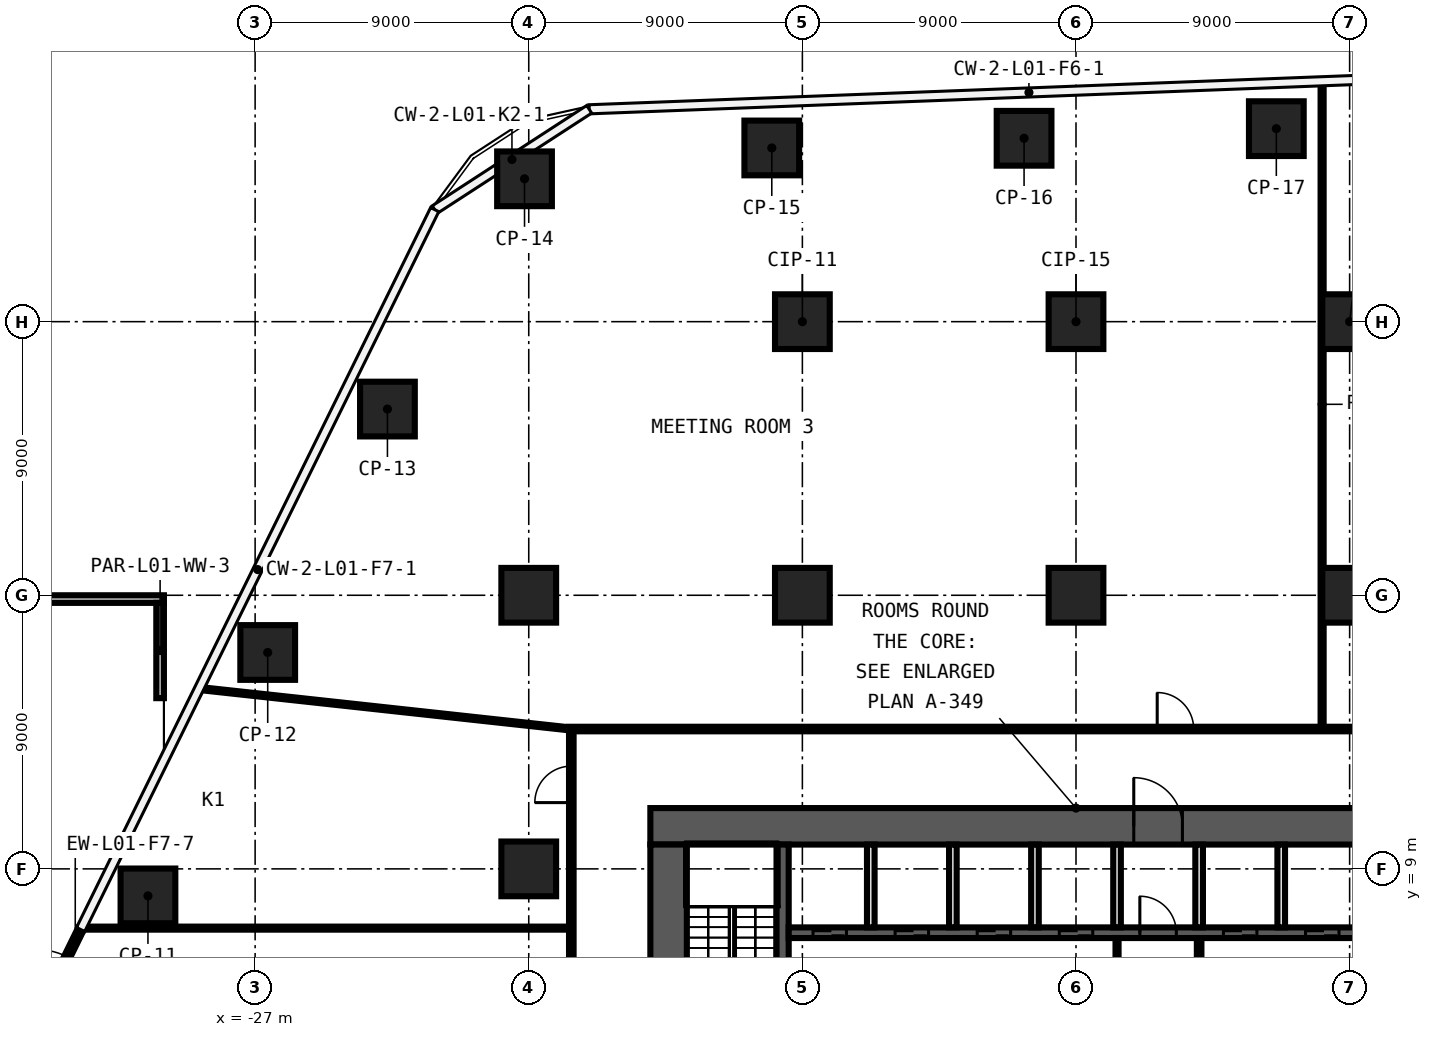
"""IFC4 building model, lengths in metres.
Left out: names, types, materials, properties, quantities, classifications, styles, units other than length and angle.
Written with IfcOpenShell. Run it as: python <this file> out.ifc"""

import sys

from ifc_helpers import new_model, si_unit, direction, frame, frame_2d, origin, origin_2d, place, context, subcontext, project, spatial, rectangle, extrude, element, fill, save


model = new_model("IFC4")
c1 = context("Model", 3, precision=1e-05, world=origin(), true_north=direction((0.0, 1.0)))
c2 = subcontext(c1, "Body", "Model", "MODEL_VIEW")
j1 = project(units=[si_unit("LENGTHUNIT", "METRE"), si_unit("PLANEANGLEUNIT", "RADIAN")], contexts=[c1])
p1 = place(None, origin())
s1 = spatial("IfcSite", under=j1, at=p1, CompositionType="ELEMENT")
p2 = place(p1, origin())
s2 = spatial("IfcBuilding", under=s1, at=p2, CompositionType="ELEMENT")
p3 = place(p2, frame((0.0, 0.0, 9.0)))
s3 = spatial("IfcBuildingStorey", under=s2, at=p3, CompositionType="ELEMENT", Elevation=9.0)
for number, where, z_axis, x_axis in (
    (1, (-30.525, 8.111, 0.0), (0.0, 0.0, 1.0), (1.0, 0.0, 0.0)),
    (2, (-26.586, 16.118, 0.0), (0.0, 0.0, 1.0), (1.0, 0.0, 0.0)),
    (3, (-22.648, 24.125, 0.0), (0.0, 0.0, 1.0), (1.0, 0.0, 0.0)),
    (4, (-18.139, 31.699, 0.0), (0.0, 0.0, 1.0), (1.0, 0.0, 0.0)),
    (5, (-10.006, 32.714, 0.0), (0.0, 0.0, 1.0), (1.0, 0.0, 0.0)),
    (6, (-1.708, 33.032, 0.0), (0.0, 0.0, 1.0), (1.0, 0.0, 0.0)),
    (7, (6.589, 33.349, 0.0), (0.0, 0.0, 1.0), (1.0, 0.0, 0.0)),
    (8, (-18.0, 9.0, 0.0), (0.0, 0.0, 1.0), (1.0, 0.0, 0.0)),
    (9, (-18.0, 18.0, 0.0), (0.0, 0.0, 1.0), (1.0, 0.0, 0.0)),
    (10, (-9.0, 18.0, 0.0), (0.0, 0.0, 1.0), (1.0, 0.0, 0.0)),
    (11, (-9.0, 27.0, 0.0), (0.0, 0.0, 1.0), (1.0, 0.0, 0.0)),
    (12, (0.0, 18.0, 0.0), (0.0, 0.0, 1.0), (1.0, 0.0, 0.0)),
    (13, (0.0, 27.0, 0.0), (0.0, 0.0, 1.0), (1.0, 0.0, 0.0)),
    (14, (9.0, 18.0, 0.0), (0.0, 0.0, 1.0), (1.0, 0.0, 0.0)),
    (15, (9.0, 27.0, 0.0), (0.0, 0.0, 1.0), (1.0, 0.0, 0.0)),
):
    element("IfcColumn", number, at=place(p3, frame(where, z_axis=z_axis, x_axis=x_axis)), inside=s3, PredefinedType="COLUMN", context=c2, shape_type="SweptSolid", body=[
        extrude(rectangle(XDim=1.8, YDim=1.8, at=origin_2d()), origin(), (0.0, 0.0, 1.0), 9.55),
    ])
p4 = place(p3, frame((-32.695, 7.051, 0.0), z_axis=(0.0, 0.0, 1.0), x_axis=(1.0, 0.0, 0.0)))
e16 = element("IfcWall", 16, at=p4, inside=s3, PredefinedType="PARTITIONING", context=c2, shape_type="SweptSolid", body=[
    extrude(rectangle(XDim=16.02, YDim=0.1, at=frame_2d((8.01, 0.0))), origin(), (0.0, 0.0, 1.0), 9.55),
])
p5 = place(p3, frame((-16.675, 13.6, 0.0), z_axis=(0.0, 0.0, 1.0), x_axis=(1.0, 0.0, 0.0)))
e17 = element("IfcWall", 17, at=p5, inside=s3, PredefinedType="PARTITIONING", context=c2, shape_type="SweptSolid", body=[
    extrude(rectangle(XDim=33.35, YDim=0.15, at=frame_2d((16.675, 0.0))), origin(), (0.0, 0.0, 1.0), 9.55),
])
p6 = place(p5, frame((27.447, 0.0, 0.0)))
e18 = element("IfcOpeningElement", 18, at=p6, cuts=e17, PredefinedType="OPENING", context=c2, shape_type="SweptSolid", body=[
    extrude(rectangle(XDim=1.2, YDim=2.1, at=frame_2d((0.6, 1.05))), frame((0.0, 0.085, 0.0), z_axis=(0.0, -1.0, 0.0), x_axis=(1.0, 0.0, 0.0)), (0.0, 0.0, 1.0), 0.17),
])
p7 = place(p5, frame((19.346, 0.0, 0.0)))
e19 = element("IfcOpeningElement", 19, at=p7, cuts=e17, PredefinedType="OPENING", context=c2, shape_type="SweptSolid", body=[
    extrude(rectangle(XDim=1.2, YDim=2.1, at=frame_2d((0.6, 1.05))), frame((0.0, 0.085, 0.0), z_axis=(0.0, -1.0, 0.0), x_axis=(1.0, 0.0, 0.0)), (0.0, 0.0, 1.0), 0.17),
])
p8 = place(p3, frame((8.095, 13.675, 0.0), z_axis=(0.0, 0.0, 1.0), x_axis=(0.0, 1.0, 0.0)))
e20 = element("IfcWall", 20, at=p8, inside=s3, PredefinedType="PARTITIONING", context=c2, shape_type="SweptSolid", body=[
    extrude(rectangle(XDim=21.213, YDim=0.1, at=frame_2d((10.606, 0.0))), origin(), (0.0, 0.0, 1.0), 9.55),
])
p9 = place(p3, frame((-16.6, -13.525, 0.0), z_axis=(0.0, 0.0, 1.0), x_axis=(0.0, 1.0, 0.0)))
e21 = element("IfcWall", 21, at=p9, inside=s3, PredefinedType="PARTITIONING", context=c2, shape_type="SweptSolid", body=[
    extrude(rectangle(XDim=27.05, YDim=0.15, at=frame_2d((13.525, 0.0))), origin(), (0.0, 0.0, 1.0), 9.55),
])
p10 = place(p9, frame((16.028, 0.0, 0.0)))
e22 = element("IfcOpeningElement", 22, at=p10, cuts=e21, PredefinedType="OPENING", context=c2, shape_type="SweptSolid", body=[
    extrude(rectangle(XDim=1.2, YDim=2.1, at=frame_2d((0.6, 1.05))), frame((0.0, 0.085, 0.0), z_axis=(0.0, -1.0, 0.0), x_axis=(1.0, 0.0, 0.0)), (0.0, 0.0, 1.0), 0.17),
])
p11 = place(p9, frame((1.121, 0.0, 0.0)))
e23 = element("IfcOpeningElement", 23, at=p11, cuts=e21, PredefinedType="OPENING", context=c2, shape_type="SweptSolid", body=[
    extrude(rectangle(XDim=1.2, YDim=2.1, at=frame_2d((0.6, 1.05))), frame((0.0, 0.085, 0.0), z_axis=(0.0, -1.0, 0.0), x_axis=(1.0, 0.0, 0.0)), (0.0, 0.0, 1.0), 0.17),
])
p12 = place(p9, frame((24.705, 0.0, 0.0)))
e24 = element("IfcOpeningElement", 24, at=p12, cuts=e21, PredefinedType="OPENING", context=c2, shape_type="SweptSolid", body=[
    extrude(rectangle(XDim=1.2, YDim=2.1, at=frame_2d((0.6, 1.05))), frame((0.0, 0.085, 0.0), z_axis=(0.0, -1.0, 0.0), x_axis=(1.0, 0.0, 0.0)), (0.0, 0.0, 1.0), 0.17),
])
p13 = place(p3, frame((-28.819, 14.931, 0.0), z_axis=(0.0, 0.0, 1.0), x_axis=(0.994112645196, -0.108351505116, 0.0)))
e25 = element("IfcWall", 25, at=p13, inside=s3, PredefinedType="PARTITIONING", context=c2, shape_type="SweptSolid", body=[
    extrude(rectangle(XDim=12.291, YDim=0.1, at=frame_2d((6.146, 0.0))), origin(), (0.0, 0.0, 1.0), 9.55),
])
p14 = place(p3, frame((-34.681, 3.059, 0.0), z_axis=(0.0, 0.0, 1.0), x_axis=(0.441343829608, 0.897338076796, 0.0)))
e26 = element("IfcWall", 26, at=p14, inside=s3, PredefinedType="SOLIDWALL", context=c2, shape_type="SweptSolid", body=[
    extrude(rectangle(XDim=4.399, YDim=0.2, at=frame_2d((2.2, 0.0))), origin(), (0.0, 0.0, 1.0), 9.55),
])
p15 = place(p14, frame((1.0, 0.0, 0.0)))
e27 = element("IfcOpeningElement", 27, at=p15, cuts=e26, PredefinedType="OPENING", context=c2, shape_type="SweptSolid", body=[
    extrude(rectangle(XDim=2.4, YDim=2.4, at=frame_2d((1.2, 1.2))), frame((0.0, 0.11, 0.0), z_axis=(0.0, -1.0, 0.0), x_axis=(1.0, 0.0, 0.0)), (0.0, 0.0, 1.0), 0.22),
])
p16 = place(p3, frame((-57.75, 17.875, 0.0), z_axis=(0.0, 0.0, 1.0), x_axis=(1.0, 0.0, 0.0)))
e28 = element("IfcWall", 28, at=p16, inside=s3, PredefinedType="PARAPET", context=c2, shape_type="SweptSolid", body=[
    extrude(rectangle(XDim=27.75, YDim=0.25, at=frame_2d((13.875, 0.0))), origin(), (0.0, 0.0, 1.0), 1.2),
])
p17 = place(p3, frame((-30.125, 17.75, 0.0), z_axis=(0.0, 0.0, 1.0), x_axis=(0.0, -1.0, 0.0)))
e29 = element("IfcWall", 29, at=p17, inside=s3, PredefinedType="PARAPET", context=c2, shape_type="SweptSolid", body=[
    extrude(rectangle(XDim=3.135, YDim=0.25, at=frame_2d((1.567, 0.0))), origin(), (0.0, 0.0, 1.0), 1.2),
])
p18 = place(p2, origin())
s4 = spatial("IfcBuildingStorey", under=s2, at=p18, CompositionType="ELEMENT", Elevation=0.0)
p19 = place(p18, frame((-21.05, 36.05, -0.3), z_axis=(0.0, 0.0, 1.0), x_axis=(1.0, 0.0, 0.0)))
e30 = element("IfcColumn", 30, at=p19, inside=s4, PredefinedType="COLUMN", context=c2, shape_type="SweptSolid", body=[
    extrude(rectangle(XDim=1.0, YDim=1.0, at=origin_2d()), origin(), (0.0, 0.0, 1.0), 18.85),
])
p20 = place(p3, frame((-14.0, 10.4, 0.0), z_axis=(0.0, 0.0, 1.0), x_axis=(1.0, 0.0, 0.0)))
e31 = element("IfcWall", 31, at=p20, inside=s3, PredefinedType="SHEAR", context=c2, shape_type="SweptSolid", body=[
    extrude(rectangle(XDim=28.0, YDim=1.2, at=frame_2d((14.0, 0.0))), origin(), (0.0, 0.0, 1.0), 9.55),
])
p21 = place(p20, frame((15.9, 0.0, 0.0)))
e32 = element("IfcOpeningElement", 32, at=p21, cuts=e31, PredefinedType="OPENING", context=c2, shape_type="SweptSolid", body=[
    extrude(rectangle(XDim=1.6, YDim=2.1, at=frame_2d((0.8, 1.05))), frame((0.0, 0.61, 0.0), z_axis=(0.0, -1.0, 0.0), x_axis=(1.0, 0.0, 0.0)), (0.0, 0.0, 1.0), 1.22),
])
p22 = place(p3, frame((-13.4, -9.8, 0.0), z_axis=(0.0, 0.0, 1.0), x_axis=(0.0, 1.0, 0.0)))
e33 = element("IfcWall", 33, at=p22, inside=s3, PredefinedType="SHEAR", context=c2, shape_type="SweptSolid", body=[
    extrude(rectangle(XDim=19.6, YDim=1.2, at=frame_2d((9.8, 0.0))), origin(), (0.0, 0.0, 1.0), 9.55),
])
p23 = place(p3, frame((-9.65, 2.3, 0.0), z_axis=(0.0, 0.0, 1.0), x_axis=(0.0, 1.0, 0.0)))
e34 = element("IfcWall", 34, at=p23, inside=s3, PredefinedType="SHEAR", context=c2, shape_type="SweptSolid", body=[
    extrude(rectangle(XDim=7.5, YDim=0.4, at=frame_2d((3.75, 0.0))), origin(), (0.0, 0.0, 1.0), 9.55),
])
p24 = place(p23, frame((1.2, 0.0, 0.0)))
e35 = element("IfcOpeningElement", 35, at=p24, cuts=e34, PredefinedType="OPENING", context=c2, shape_type="SweptSolid", body=[
    extrude(rectangle(XDim=1.2, YDim=2.1, at=frame_2d((0.6, 1.05))), frame((0.0, 0.21, 0.0), z_axis=(0.0, -1.0, 0.0), x_axis=(1.0, 0.0, 0.0)), (0.0, 0.0, 1.0), 0.42),
])
p25 = place(p3, frame((-9.45, 6.9, 0.0), z_axis=(0.0, 0.0, 1.0), x_axis=(1.0, 0.0, 0.0)))
e36 = element("IfcWall", 36, at=p25, inside=s3, PredefinedType="SHEAR", context=c2, shape_type="SweptSolid", body=[
    extrude(rectangle(XDim=18.9, YDim=0.35, at=frame_2d((9.45, 0.0))), origin(), (0.0, 0.0, 1.0), 9.55),
])
p26 = place(p25, frame((0.8, 0.0, 0.0)))
e37 = element("IfcOpeningElement", 37, at=p26, cuts=e36, PredefinedType="OPENING", context=c2, shape_type="SweptSolid", body=[
    extrude(rectangle(XDim=1.1, YDim=2.1, at=frame_2d((0.55, 1.05))), frame((0.0, 0.185, 0.0), z_axis=(0.0, -1.0, 0.0), x_axis=(1.0, 0.0, 0.0)), (0.0, 0.0, 1.0), 0.37),
])
p27 = place(p25, frame((3.5, 0.0, 0.0)))
e38 = element("IfcOpeningElement", 38, at=p27, cuts=e36, PredefinedType="OPENING", context=c2, shape_type="SweptSolid", body=[
    extrude(rectangle(XDim=1.1, YDim=2.1, at=frame_2d((0.55, 1.05))), frame((0.0, 0.185, 0.0), z_axis=(0.0, -1.0, 0.0), x_axis=(1.0, 0.0, 0.0)), (0.0, 0.0, 1.0), 0.37),
])
p28 = place(p25, frame((6.2, 0.0, 0.0)))
e39 = element("IfcOpeningElement", 39, at=p28, cuts=e36, PredefinedType="OPENING", context=c2, shape_type="SweptSolid", body=[
    extrude(rectangle(XDim=1.1, YDim=2.1, at=frame_2d((0.55, 1.05))), frame((0.0, 0.185, 0.0), z_axis=(0.0, -1.0, 0.0), x_axis=(1.0, 0.0, 0.0)), (0.0, 0.0, 1.0), 0.37),
])
p29 = place(p25, frame((8.9, 0.0, 0.0)))
e40 = element("IfcOpeningElement", 40, at=p29, cuts=e36, PredefinedType="OPENING", context=c2, shape_type="SweptSolid", body=[
    extrude(rectangle(XDim=1.1, YDim=2.1, at=frame_2d((0.55, 1.05))), frame((0.0, 0.185, 0.0), z_axis=(0.0, -1.0, 0.0), x_axis=(1.0, 0.0, 0.0)), (0.0, 0.0, 1.0), 0.37),
])
p30 = place(p25, frame((11.55, 0.0, 0.0)))
e41 = element("IfcOpeningElement", 41, at=p30, cuts=e36, PredefinedType="OPENING", context=c2, shape_type="SweptSolid", body=[
    extrude(rectangle(XDim=1.2, YDim=2.1, at=frame_2d((0.6, 1.05))), frame((0.0, 0.185, 0.0), z_axis=(0.0, -1.0, 0.0), x_axis=(1.0, 0.0, 0.0)), (0.0, 0.0, 1.0), 0.37),
])
p31 = place(p25, frame((14.3, 0.0, 0.0)))
e42 = element("IfcOpeningElement", 42, at=p31, cuts=e36, PredefinedType="OPENING", context=c2, shape_type="SweptSolid", body=[
    extrude(rectangle(XDim=1.1, YDim=2.1, at=frame_2d((0.55, 1.05))), frame((0.0, 0.185, 0.0), z_axis=(0.0, -1.0, 0.0), x_axis=(1.0, 0.0, 0.0)), (0.0, 0.0, 1.0), 0.37),
])
p32 = place(p25, frame((17.0, 0.0, 0.0)))
e43 = element("IfcOpeningElement", 43, at=p32, cuts=e36, PredefinedType="OPENING", context=c2, shape_type="SweptSolid", body=[
    extrude(rectangle(XDim=1.1, YDim=2.1, at=frame_2d((0.55, 1.05))), frame((0.0, 0.185, 0.0), z_axis=(0.0, -1.0, 0.0), x_axis=(1.0, 0.0, 0.0)), (0.0, 0.0, 1.0), 0.37),
])
p33 = place(p3, frame((6.75, 7.075, 0.0), z_axis=(0.0, 0.0, 1.0), x_axis=(0.0, 1.0, 0.0)))
e44 = element("IfcWall", 44, at=p33, inside=s3, PredefinedType="SOLIDWALL", context=c2, shape_type="SweptSolid", body=[
    extrude(rectangle(XDim=2.725, YDim=0.25, at=frame_2d((1.363, 0.0))), origin(), (0.0, 0.0, 1.0), 9.55),
])
p34 = place(p3, frame((4.05, 6.725, 0.0), z_axis=(0.0, 0.0, 1.0), x_axis=(0.0, -1.0, 0.0)))
e45 = element("IfcWall", 45, at=p34, inside=s3, PredefinedType="PARTITIONING", context=c2, shape_type="SweptSolid", body=[
    extrude(rectangle(XDim=3.25, YDim=0.15, at=frame_2d((1.625, 0.0))), origin(), (0.0, 0.0, 1.0), 9.55),
])
p35 = place(p34, frame((1.025, 0.0, 0.0)))
e46 = element("IfcOpeningElement", 46, at=p35, cuts=e45, PredefinedType="OPENING", context=c2, shape_type="SweptSolid", body=[
    extrude(rectangle(XDim=1.2, YDim=2.1, at=frame_2d((0.6, 1.05))), frame((0.0, 0.085, 0.0), z_axis=(0.0, -1.0, 0.0), x_axis=(1.0, 0.0, 0.0)), (0.0, 0.0, 1.0), 0.17),
])
p36 = place(p3, frame((4.05, 7.075, 0.0), z_axis=(0.0, 0.0, 1.0), x_axis=(0.0, 1.0, 0.0)))
e47 = element("IfcWall", 47, at=p36, inside=s3, PredefinedType="SOLIDWALL", context=c2, shape_type="SweptSolid", body=[
    extrude(rectangle(XDim=2.725, YDim=0.25, at=frame_2d((1.363, 0.0))), origin(), (0.0, 0.0, 1.0), 9.55),
])
p37 = place(p3, frame((1.35, 6.725, 0.0), z_axis=(0.0, 0.0, 1.0), x_axis=(0.0, -1.0, 0.0)))
e48 = element("IfcWall", 48, at=p37, inside=s3, PredefinedType="PARTITIONING", context=c2, shape_type="SweptSolid", body=[
    extrude(rectangle(XDim=3.25, YDim=0.1, at=frame_2d((1.625, 0.0))), origin(), (0.0, 0.0, 1.0), 9.55),
])
p38 = place(p37, frame((1.025, 0.0, 0.0)))
e49 = element("IfcOpeningElement", 49, at=p38, cuts=e48, PredefinedType="OPENING", context=c2, shape_type="SweptSolid", body=[
    extrude(rectangle(XDim=1.2, YDim=2.1, at=frame_2d((0.6, 1.05))), frame((0.0, 0.06, 0.0), z_axis=(0.0, -1.0, 0.0), x_axis=(1.0, 0.0, 0.0)), (0.0, 0.0, 1.0), 0.12),
])
for number, where, z_axis, x_axis in (
    (50, (1.35, 7.075, 0.0), (0.0, 0.0, 1.0), (0.0, 1.0, 0.0)),
    (51, (-1.35, 7.075, 0.0), (0.0, 0.0, 1.0), (0.0, 1.0, 0.0)),
    (52, (-4.05, 7.075, 0.0), (0.0, 0.0, 1.0), (0.0, 1.0, 0.0)),
    (53, (-6.75, 7.075, 0.0), (0.0, 0.0, 1.0), (0.0, 1.0, 0.0)),
):
    element("IfcWall", number, at=place(p3, frame(where, z_axis=z_axis, x_axis=x_axis)), inside=s3, PredefinedType="SOLIDWALL", context=c2, shape_type="SweptSolid", body=[
        extrude(rectangle(XDim=2.725, YDim=0.25, at=frame_2d((1.363, 0.0))), origin(), (0.0, 0.0, 1.0), 9.55),
    ])
p39 = place(p7, origin())
e54 = element("IfcDoor", 54, at=p39, inside=s3, OperationType="SINGLE_SWING_LEFT", PredefinedType="DOOR", context=c2, shape_type="SweptSolid", body=[
    extrude(rectangle(XDim=1.2, YDim=2.1, at=frame_2d((0.6, 1.05))), frame((0.0, 0.025, 0.0), z_axis=(0.0, -1.0, 0.0), x_axis=(1.0, 0.0, 0.0)), (0.0, 0.0, 1.0), 0.05),
])
fill(e19, e54)
p40 = place(p12, origin())
e55 = element("IfcDoor", 55, at=p40, inside=s3, OperationType="SINGLE_SWING_RIGHT", PredefinedType="DOOR", context=c2, shape_type="SweptSolid", body=[
    extrude(rectangle(XDim=1.2, YDim=2.1, at=frame_2d((0.6, 1.05))), frame((0.0, 0.025, 0.0), z_axis=(0.0, -1.0, 0.0), x_axis=(1.0, 0.0, 0.0)), (0.0, 0.0, 1.0), 0.05),
])
fill(e24, e55)
p41 = place(p15, origin())
e56 = element("IfcDoor", 56, at=p41, inside=s3, OperationType="SINGLE_SWING_LEFT", PredefinedType="DOOR", context=c2, shape_type="SweptSolid", body=[
    extrude(rectangle(XDim=2.4, YDim=2.4, at=frame_2d((1.2, 1.2))), frame((0.0, 0.025, 0.0), z_axis=(0.0, -1.0, 0.0), x_axis=(1.0, 0.0, 0.0)), (0.0, 0.0, 1.0), 0.05),
])
fill(e27, e56)
p42 = place(p26, origin())
e57 = element("IfcDoor", 57, at=p42, inside=s3, OperationType="DOUBLE_DOOR_SLIDING", PredefinedType="DOOR", context=c2, shape_type="SweptSolid", body=[
    extrude(rectangle(XDim=1.1, YDim=2.1, at=frame_2d((0.55, 1.05))), frame((0.0, 0.025, 0.0), z_axis=(0.0, -1.0, 0.0), x_axis=(1.0, 0.0, 0.0)), (0.0, 0.0, 1.0), 0.05),
])
fill(e37, e57)
p43 = place(p27, origin())
e58 = element("IfcDoor", 58, at=p43, inside=s3, OperationType="DOUBLE_DOOR_SLIDING", PredefinedType="DOOR", context=c2, shape_type="SweptSolid", body=[
    extrude(rectangle(XDim=1.1, YDim=2.1, at=frame_2d((0.55, 1.05))), frame((0.0, 0.025, 0.0), z_axis=(0.0, -1.0, 0.0), x_axis=(1.0, 0.0, 0.0)), (0.0, 0.0, 1.0), 0.05),
])
fill(e38, e58)
p44 = place(p28, origin())
e59 = element("IfcDoor", 59, at=p44, inside=s3, OperationType="DOUBLE_DOOR_SLIDING", PredefinedType="DOOR", context=c2, shape_type="SweptSolid", body=[
    extrude(rectangle(XDim=1.1, YDim=2.1, at=frame_2d((0.55, 1.05))), frame((0.0, 0.025, 0.0), z_axis=(0.0, -1.0, 0.0), x_axis=(1.0, 0.0, 0.0)), (0.0, 0.0, 1.0), 0.05),
])
fill(e39, e59)
p45 = place(p29, origin())
e60 = element("IfcDoor", 60, at=p45, inside=s3, OperationType="DOUBLE_DOOR_SLIDING", PredefinedType="DOOR", context=c2, shape_type="SweptSolid", body=[
    extrude(rectangle(XDim=1.1, YDim=2.1, at=frame_2d((0.55, 1.05))), frame((0.0, 0.025, 0.0), z_axis=(0.0, -1.0, 0.0), x_axis=(1.0, 0.0, 0.0)), (0.0, 0.0, 1.0), 0.05),
])
fill(e40, e60)
p46 = place(p21, origin())
e61 = element("IfcDoor", 61, at=p46, inside=s3, OperationType="DOUBLE_DOOR_SINGLE_SWING", PredefinedType="DOOR", context=c2, shape_type="SweptSolid", body=[
    extrude(rectangle(XDim=1.6, YDim=2.1, at=frame_2d((0.8, 1.05))), frame((0.0, 0.025, 0.0), z_axis=(0.0, -1.0, 0.0), x_axis=(1.0, 0.0, 0.0)), (0.0, 0.0, 1.0), 0.05),
])
fill(e32, e61)
p47 = place(p30, origin())
e62 = element("IfcDoor", 62, at=p47, inside=s3, OperationType="SINGLE_SWING_LEFT", PredefinedType="DOOR", context=c2, shape_type="SweptSolid", body=[
    extrude(rectangle(XDim=1.2, YDim=2.1, at=frame_2d((0.6, 1.05))), frame((0.0, 0.025, 0.0), z_axis=(0.0, -1.0, 0.0), x_axis=(1.0, 0.0, 0.0)), (0.0, 0.0, 1.0), 0.05),
])
fill(e41, e62)
p48 = place(p31, origin())
e63 = element("IfcDoor", 63, at=p48, inside=s3, OperationType="DOUBLE_DOOR_SLIDING", PredefinedType="DOOR", context=c2, shape_type="SweptSolid", body=[
    extrude(rectangle(XDim=1.1, YDim=2.1, at=frame_2d((0.55, 1.05))), frame((0.0, 0.025, 0.0), z_axis=(0.0, -1.0, 0.0), x_axis=(1.0, 0.0, 0.0)), (0.0, 0.0, 1.0), 0.05),
])
fill(e42, e63)
p49 = place(p32, origin())
e64 = element("IfcDoor", 64, at=p49, inside=s3, OperationType="DOUBLE_DOOR_SLIDING", PredefinedType="DOOR", context=c2, shape_type="SweptSolid", body=[
    extrude(rectangle(XDim=1.1, YDim=2.1, at=frame_2d((0.55, 1.05))), frame((0.0, 0.025, 0.0), z_axis=(0.0, -1.0, 0.0), x_axis=(1.0, 0.0, 0.0)), (0.0, 0.0, 1.0), 0.05),
])
fill(e43, e64)
save(model, sys.argv[1])
